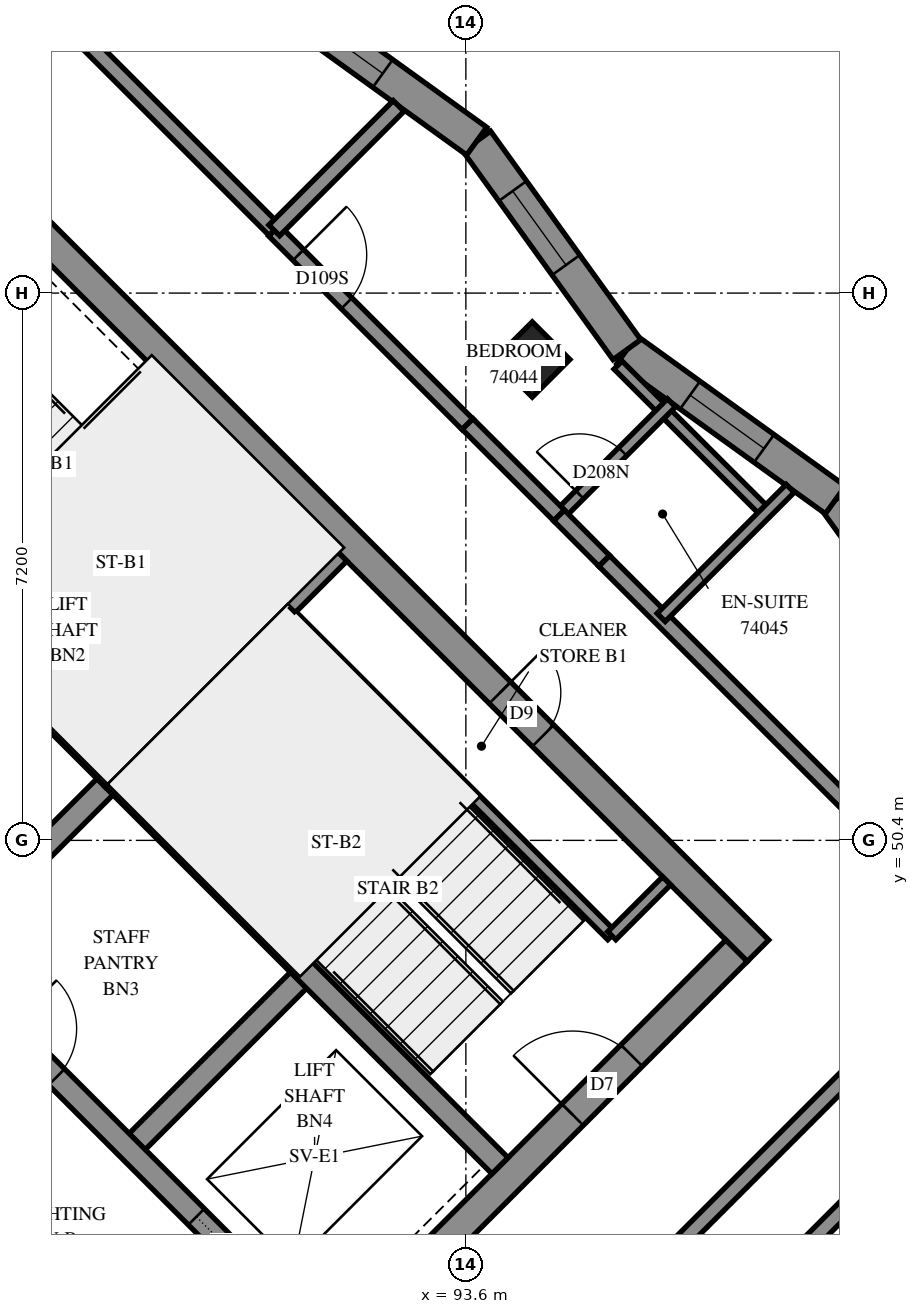
"""IFC4 building model, lengths in metres.
Left out: names, types, materials, properties, quantities, classifications, styles, units other than length and angle.
Written with IfcOpenShell. Run it as: python <this file> out.ifc"""

import sys

from ifc_helpers import new_model, si_unit, direction, frame, frame_2d, origin, origin_2d, place, context, subcontext, project, spatial, polyline, rectangle, outline, extrude, element, fill, save


model = new_model("IFC4")
c1 = context("Model", 3, precision=1e-05, world=origin(), true_north=direction((0.0, 1.0)))
c2 = subcontext(c1, "Body", "Model", "MODEL_VIEW")
j1 = project(units=[si_unit("LENGTHUNIT", "METRE"), si_unit("PLANEANGLEUNIT", "RADIAN")], contexts=[c1])
p1 = place(None, origin())
s1 = spatial("IfcSite", under=j1, at=p1, CompositionType="ELEMENT")
p2 = place(p1, origin())
s2 = spatial("IfcBuilding", under=s1, at=p2, CompositionType="ELEMENT")
p3 = place(p2, frame((0.0, 0.0, 271.0)))
s3 = spatial("IfcBuildingStorey", under=s2, at=p3, CompositionType="ELEMENT", Elevation=271.0)
p4 = place(p3, frame((94.474, 56.727, 0.0), z_axis=(0.0, 0.0, 1.0), x_axis=(0.7071067812, -0.7071067812, 0.0)))
e1 = element("IfcColumn", 1, at=p4, inside=s3, PredefinedType="COLUMN", context=c2, shape_type="SweptSolid", body=[
    extrude(rectangle(XDim=0.7, YDim=0.7, at=origin_2d()), origin(), (0.0, 0.0, 1.0), 3.1),
])
p5 = place(p3, frame((86.695, 59.696, -0.3), z_axis=(0.0, 0.0, 1.0), x_axis=(0.7071100706, -0.7071034917, 0.0)))
e2 = element("IfcWall", 2, at=p5, inside=s3, PredefinedType="SHEAR", context=c2, shape_type="SweptSolid", body=[
    extrude(rectangle(XDim=15.2, YDim=0.4, at=frame_2d((7.6, 0.0))), origin(), (0.0, 0.0, 1.0), 2.7),
])
p6 = place(p5, frame((10.4, 0.0, 0.3)))
e3 = element("IfcOpeningElement", 3, at=p6, cuts=e2, PredefinedType="OPENING", context=c2, shape_type="SweptSolid", body=[
    extrude(rectangle(XDim=0.8, YDim=2.1, at=frame_2d((0.4, 1.05))), frame((0.0, 0.21, 0.0), z_axis=(0.0, -1.0, 0.0), x_axis=(1.0, 0.0, 0.0)), (0.0, 0.0, 1.0), 0.42),
])
p7 = place(p3, frame((86.978, 38.766, -0.3), z_axis=(0.0, 0.0, 1.0), x_axis=(0.7071067812, 0.7071067812, 0.0)))
e4 = element("IfcWall", 4, at=p7, inside=s3, PredefinedType="SHEAR", context=c2, shape_type="SweptSolid", body=[
    extrude(rectangle(XDim=14.4, YDim=0.4, at=frame_2d((7.2, 0.0))), origin(), (0.0, 0.0, 1.0), 2.7),
])
p8 = place(p7, frame((4.55, 0.0, 0.3)))
e5 = element("IfcOpeningElement", 5, at=p8, cuts=e4, PredefinedType="OPENING", context=c2, shape_type="SweptSolid", body=[
    extrude(rectangle(XDim=1.1, YDim=2.1, at=frame_2d((0.55, 1.05))), frame((0.0, 0.21, 0.0), z_axis=(0.0, -1.0, 0.0), x_axis=(1.0, 0.0, 0.0)), (0.0, 0.0, 1.0), 0.42),
])
p9 = place(p7, frame((11.35, 0.0, 0.3)))
e6 = element("IfcOpeningElement", 6, at=p9, cuts=e4, PredefinedType="OPENING", context=c2, shape_type="SweptSolid", body=[
    extrude(rectangle(XDim=1.1, YDim=2.1, at=frame_2d((0.55, 1.05))), frame((0.0, 0.21, 0.0), z_axis=(0.0, -1.0, 0.0), x_axis=(1.0, 0.0, 0.0)), (0.0, 0.0, 1.0), 0.42),
])
for number, where, z_axis, x_axis in (
    (7, (86.625, 48.878, 0.0), (0.0, 0.0, 1.0), (0.707, 0.707, 0.0)),
    (8, (89.17, 46.332, 0.0), (0.0, 0.0, 1.0), (0.707, 0.707, 0.0)),
):
    element("IfcWall", number, at=place(p3, frame(where, z_axis=z_axis, x_axis=x_axis)), inside=s3, PredefinedType="SOLIDWALL", context=c2, shape_type="SweptSolid", body=[
        extrude(rectangle(XDim=3.3, YDim=0.3, at=frame_2d((1.65, 0.0))), origin(), (0.0, 0.0, 1.0), 3.1),
    ])
p10 = place(p3, frame((78.988, 51.423, 0.0), z_axis=(0.0, 0.0, 1.0), x_axis=(0.7071067812, -0.7071067812, 0.0)))
e9 = element("IfcWall", 9, at=p10, inside=s3, PredefinedType="SOLIDWALL", context=c2, shape_type="SweptSolid", body=[
    extrude(rectangle(XDim=14.4, YDim=0.3, at=frame_2d((7.2, 0.0))), origin(), (0.0, 0.0, 1.0), 3.1),
])
p11 = place(p10, frame((1.35, 0.0, 0.0)))
e10 = element("IfcOpeningElement", 10, at=p11, cuts=e9, PredefinedType="OPENING", context=c2, shape_type="SweptSolid", body=[
    extrude(rectangle(XDim=0.9, YDim=2.1, at=frame_2d((0.45, 1.05))), frame((0.0, 0.16, 0.0), z_axis=(0.0, -1.0, 0.0), x_axis=(1.0, 0.0, 0.0)), (0.0, 0.0, 1.0), 0.32),
])
p12 = place(p10, frame((4.95, 0.0, 0.0)))
e11 = element("IfcOpeningElement", 11, at=p12, cuts=e9, PredefinedType="OPENING", context=c2, shape_type="SweptSolid", body=[
    extrude(rectangle(XDim=0.9, YDim=2.1, at=frame_2d((0.45, 1.05))), frame((0.0, 0.16, 0.0), z_axis=(0.0, -1.0, 0.0), x_axis=(1.0, 0.0, 0.0)), (0.0, 0.0, 1.0), 0.32),
])
p13 = place(p10, frame((8.55, 0.0, 0.0)))
e12 = element("IfcOpeningElement", 12, at=p13, cuts=e9, PredefinedType="OPENING", context=c2, shape_type="SweptSolid", body=[
    extrude(rectangle(XDim=0.9, YDim=2.1, at=frame_2d((0.45, 1.05))), frame((0.0, 0.16, 0.0), z_axis=(0.0, -1.0, 0.0), x_axis=(1.0, 0.0, 0.0)), (0.0, 0.0, 1.0), 0.32),
])
p14 = place(p10, frame((12.05, 0.0, 0.0)))
e13 = element("IfcOpeningElement", 13, at=p14, cuts=e9, PredefinedType="OPENING", context=c2, shape_type="SweptSolid", body=[
    extrude(rectangle(XDim=1.1, YDim=2.1, at=frame_2d((0.55, 1.05))), frame((0.0, 0.16, 0.0), z_axis=(0.0, -1.0, 0.0), x_axis=(1.0, 0.0, 0.0)), (0.0, 0.0, 1.0), 0.32),
])
p15 = place(p3, frame((81.534, 53.969, 0.0), z_axis=(0.0, 0.0, 1.0), x_axis=(0.707103309, -0.7071102534, 0.0)))
e14 = element("IfcWall", 14, at=p15, inside=s3, PredefinedType="SOLIDWALL", context=c2, shape_type="SweptSolid", body=[
    extrude(rectangle(XDim=14.4, YDim=0.3, at=frame_2d((7.2, 0.0))), origin(), (0.0, 0.0, 1.0), 3.1),
])
p16 = place(p15, frame((8.55, 0.0, 0.0)))
e15 = element("IfcOpeningElement", 15, at=p16, cuts=e14, PredefinedType="OPENING", context=c2, shape_type="SweptSolid", body=[
    extrude(rectangle(XDim=0.9, YDim=2.1, at=frame_2d((0.45, 1.05))), frame((0.0, 0.16, 0.0), z_axis=(0.0, -1.0, 0.0), x_axis=(1.0, 0.0, 0.0)), (0.0, 0.0, 1.0), 0.32),
])
p17 = place(p15, frame((1.25, 0.0, 0.0)))
e16 = element("IfcOpeningElement", 16, at=p17, cuts=e14, PredefinedType="OPENING", context=c2, shape_type="SweptSolid", body=[
    extrude(rectangle(XDim=1.1, YDim=2.1, at=frame_2d((0.55, 1.05))), frame((0.0, 0.16, 0.0), z_axis=(0.0, -1.0, 0.0), x_axis=(1.0, 0.0, 0.0)), (0.0, 0.0, 1.0), 0.32),
])
p18 = place(p15, frame((4.85, 0.0, 0.0)))
e17 = element("IfcOpeningElement", 17, at=p18, cuts=e14, PredefinedType="OPENING", context=c2, shape_type="SweptSolid", body=[
    extrude(rectangle(XDim=1.1, YDim=2.1, at=frame_2d((0.55, 1.05))), frame((0.0, 0.16, 0.0), z_axis=(0.0, -1.0, 0.0), x_axis=(1.0, 0.0, 0.0)), (0.0, 0.0, 1.0), 0.32),
])
p19 = place(p15, frame((12.05, 0.0, 0.0)))
e18 = element("IfcOpeningElement", 18, at=p19, cuts=e14, PredefinedType="OPENING", context=c2, shape_type="SweptSolid", body=[
    extrude(rectangle(XDim=1.1, YDim=2.1, at=frame_2d((0.55, 1.05))), frame((0.0, 0.16, 0.0), z_axis=(0.0, -1.0, 0.0), x_axis=(1.0, 0.0, 0.0)), (0.0, 0.0, 1.0), 0.32),
])
for number, where, z_axis, x_axis in (
    (19, (83.867, 56.302, 0.0), (0.0, 0.0, 1.0), (0.707, -0.707, 0.0)),
    (20, (88.958, 51.211, 0.0), (0.0, 0.0, 1.0), (0.707, -0.707, 0.0)),
):
    element("IfcWall", number, at=place(p3, frame(where, z_axis=z_axis, x_axis=x_axis)), inside=s3, PredefinedType="SOLIDWALL", context=c2, shape_type="SweptSolid", body=[
        extrude(rectangle(XDim=7.2, YDim=0.3, at=frame_2d((3.6, 0.0))), origin(), (0.0, 0.0, 1.0), 3.1),
    ])
p20 = place(p3, frame((88.958, 51.211, 0.0), z_axis=(0.0, 0.0, 1.0), x_axis=(0.7071067812, 0.7071067812, 0.0)))
e21 = element("IfcWall", 21, at=p20, inside=s3, PredefinedType="SOLIDWALL", context=c2, shape_type="SweptSolid", body=[
    extrude(rectangle(XDim=4.2, YDim=0.3, at=frame_2d((2.1, 0.0))), origin(), (0.0, 0.0, 1.0), 3.1),
])
p21 = place(p3, frame((100.45, 52.121, 0.0), z_axis=(0.0, 0.0, 1.0), x_axis=(-0.5846130088, 0.8113122888, 0.0)))
e22 = element("IfcWall", 22, at=p21, inside=s3, PredefinedType="SOLIDWALL", context=c2, shape_type="SweptSolid", body=[
    extrude(outline(polyline([(0.056, -0.225), (3.437, -0.225), (3.364, 0.225), (-0.056, 0.225), (0.056, -0.225)])), origin(), (0.0, 0.0, 1.0), 3.1),
])
p22 = place(p21, frame((1.082, 0.0, 0.45)))
e23 = element("IfcOpeningElement", 23, at=p22, cuts=e22, PredefinedType="OPENING", context=c2, shape_type="SweptSolid", body=[
    extrude(rectangle(XDim=1.2, YDim=2.55, at=frame_2d((0.6, 1.275))), frame((0.0, 0.235, 0.0), z_axis=(0.0, -1.0, 0.0), x_axis=(1.0, 0.0, 0.0)), (0.0, 0.0, 1.0), 0.47),
])
p23 = place(p3, frame((98.462, 54.88, 0.0), z_axis=(0.0, 0.0, 1.0), x_axis=(-0.8113121077, 0.5846132601, 0.0)))
e24 = element("IfcWall", 24, at=p23, inside=s3, PredefinedType="SOLIDWALL", context=c2, shape_type="SweptSolid", body=[
    extrude(outline(polyline([(-0.036, -0.225), (3.344, -0.225), (3.417, 0.225), (0.036, 0.225), (-0.036, -0.225)])), origin(), (0.0, 0.0, 1.0), 3.1),
])
p24 = place(p23, frame((1.157, 0.0, 0.45)))
e25 = element("IfcOpeningElement", 25, at=p24, cuts=e24, PredefinedType="OPENING", context=c2, shape_type="SweptSolid", body=[
    extrude(rectangle(XDim=1.2, YDim=2.55, at=frame_2d((0.6, 1.275))), frame((0.0, 0.235, 0.0), z_axis=(0.0, -1.0, 0.0), x_axis=(1.0, 0.0, 0.0)), (0.0, 0.0, 1.0), 0.47),
])
p25 = place(p3, frame((95.719, 56.856, 0.0), z_axis=(0.0, 0.0, 1.0), x_axis=(-0.5846132601, 0.8113121077, 0.0)))
e26 = element("IfcWall", 26, at=p25, inside=s3, PredefinedType="SOLIDWALL", context=c2, shape_type="SweptSolid", body=[
    extrude(outline(polyline([(0.036, -0.225), (3.417, -0.225), (3.344, 0.225), (-0.036, 0.225), (0.036, -0.225)])), origin(), (0.0, 0.0, 1.0), 3.1),
])
p26 = place(p25, frame((1.372, 0.0, 0.45)))
e27 = element("IfcOpeningElement", 27, at=p26, cuts=e26, PredefinedType="OPENING", context=c2, shape_type="SweptSolid", body=[
    extrude(rectangle(XDim=1.2, YDim=2.55, at=frame_2d((0.6, 1.275))), frame((0.0, 0.235, 0.0), z_axis=(0.0, -1.0, 0.0), x_axis=(1.0, 0.0, 0.0)), (0.0, 0.0, 1.0), 0.47),
])
p27 = place(p3, frame((93.742, 59.599, 0.0), z_axis=(0.0, 0.0, 1.0), x_axis=(-0.8113222169, 0.5845992306, 0.0)))
e28 = element("IfcWall", 28, at=p27, inside=s3, PredefinedType="SOLIDWALL", context=c2, shape_type="SweptSolid", body=[
    extrude(outline(polyline([(-0.036, -0.225), (3.344, -0.225), (3.417, 0.225), (0.036, 0.225), (-0.036, -0.225)])), origin(), (0.0, 0.0, 1.0), 3.1),
])
p28 = place(p27, frame((1.523, 0.0, 0.45)))
e29 = element("IfcOpeningElement", 29, at=p28, cuts=e28, PredefinedType="OPENING", context=c2, shape_type="SweptSolid", body=[
    extrude(rectangle(XDim=1.2, YDim=2.55, at=frame_2d((0.6, 1.275))), frame((0.0, 0.235, 0.0), z_axis=(0.0, -1.0, 0.0), x_axis=(1.0, 0.0, 0.0)), (0.0, 0.0, 1.0), 0.47),
])
p29 = place(p3, frame((91.313, 53.354, 0.0), z_axis=(0.0, 0.0, 1.0), x_axis=(0.7071067812, -0.7071067812, 0.0)))
e30 = element("IfcWall", 30, at=p29, inside=s3, PredefinedType="PARTITIONING", context=c2, shape_type="SweptSolid", body=[
    extrude(rectangle(XDim=5.95, YDim=0.15, at=frame_2d((2.975, 0.0))), origin(), (0.0, 0.0, 1.0), 3.1),
])
p30 = place(p3, frame((95.52, 49.146, 0.0), z_axis=(0.0, 0.0, 1.0), x_axis=(0.7071067812, 0.7071067812, 0.0)))
e31 = element("IfcWall", 31, at=p30, inside=s3, PredefinedType="PARTITIONING", context=c2, shape_type="SweptSolid", body=[
    extrude(rectangle(XDim=1.02, YDim=0.15, at=frame_2d((0.51, 0.0))), origin(), (0.0, 0.0, 1.0), 3.1),
])
p31 = place(p3, frame((93.908, 42.586, 0.0), z_axis=(0.0, 0.0, 1.0), x_axis=(0.7071067812, 0.7071067812, 0.0)))
e32 = element("IfcWall", 32, at=p31, inside=s3, PredefinedType="PARTITIONING", context=c2, shape_type="SweptSolid", body=[
    extrude(rectangle(XDim=9.198, YDim=0.2, at=frame_2d((4.599, 0.0))), origin(), (0.0, 0.0, 1.0), 3.1),
])
p32 = place(p31, frame((0.254, 0.0, 0.0)))
e33 = element("IfcOpeningElement", 33, at=p32, cuts=e32, PredefinedType="OPENING", context=c2, shape_type="SweptSolid", body=[
    extrude(rectangle(XDim=1.0, YDim=2.1, at=frame_2d((0.5, 1.05))), frame((0.0, 0.11, 0.0), z_axis=(0.0, -1.0, 0.0), x_axis=(1.0, 0.0, 0.0)), (0.0, 0.0, 1.0), 0.22),
])
p33 = place(p3, frame((95.419, 54.077, 0.0), z_axis=(0.0, 0.0, 1.0), x_axis=(0.7071067812, -0.7071067812, 0.0)))
e34 = element("IfcWall", 34, at=p33, inside=s3, PredefinedType="PARTITIONING", context=c2, shape_type="SweptSolid", body=[
    extrude(rectangle(XDim=7.057, YDim=0.2, at=frame_2d((3.528, 0.0))), origin(), (0.0, 0.0, 1.0), 3.1),
])
p34 = place(p3, frame((94.755, 41.737, 0.0), z_axis=(0.0, 0.0, 1.0), x_axis=(0.7071146549, 0.7070989073, 0.0)))
e35 = element("IfcWall", 35, at=p34, inside=s3, PredefinedType="PARTITIONING", context=c2, shape_type="SweptSolid", body=[
    extrude(rectangle(XDim=6.35, YDim=0.2, at=frame_2d((3.175, 0.0))), origin(), (0.0, 0.0, 1.0), 3.1),
])
p35 = place(p3, frame((88.537, 60.973, 0.0), z_axis=(0.0, 0.0, 1.0), x_axis=(0.7071067812, -0.7071067812, 0.0)))
e36 = element("IfcWall", 36, at=p35, inside=s3, PredefinedType="PARTITIONING", context=c2, shape_type="SweptSolid", body=[
    extrude(rectangle(XDim=3.601, YDim=0.2, at=frame_2d((1.8, 0.0))), origin(), (0.0, 0.0, 1.0), 3.1),
])
p36 = place(p3, frame((91.077, 58.421, 0.0), z_axis=(0.0, 0.0, 1.0), x_axis=(0.7068288851, -0.7073845681, 0.0)))
e37 = element("IfcWall", 37, at=p36, inside=s3, PredefinedType="PARTITIONING", context=c2, shape_type="SweptSolid", body=[
    extrude(rectangle(XDim=3.599, YDim=0.2, at=frame_2d((1.8, 0.0))), origin(), (0.0, 0.0, 1.0), 3.1),
])
p37 = place(p36, frame((0.451, 0.0, 0.0)))
e38 = element("IfcOpeningElement", 38, at=p37, cuts=e37, PredefinedType="OPENING", context=c2, shape_type="SweptSolid", body=[
    extrude(rectangle(XDim=0.9, YDim=2.1, at=frame_2d((0.45, 1.05))), frame((0.0, 0.11, 0.0), z_axis=(0.0, -1.0, 0.0), x_axis=(1.0, 0.0, 0.0)), (0.0, 0.0, 1.0), 0.22),
])
p38 = place(p3, frame((95.602, 56.653, 0.0), z_axis=(0.0, 0.0, 1.0), x_axis=(0.7076157525, -0.7065974433, 0.0)))
e39 = element("IfcWall", 39, at=p38, inside=s3, PredefinedType="PARTITIONING", context=c2, shape_type="SweptSolid", body=[
    extrude(rectangle(XDim=2.75, YDim=0.15, at=frame_2d((1.375, 0.0))), origin(), (0.0, 0.0, 1.0), 3.1),
])
p39 = place(p3, frame((96.169, 53.333, 0.0), z_axis=(0.0, 0.0, 1.0), x_axis=(0.7071067812, 0.7071067812, 0.0)))
e40 = element("IfcWall", 40, at=p39, inside=s3, PredefinedType="PARTITIONING", context=c2, shape_type="SweptSolid", body=[
    extrude(rectangle(XDim=2.401, YDim=0.15, at=frame_2d((1.201, 0.0))), origin(), (0.0, 0.0, 1.0), 3.1),
])
p40 = place(p3, frame((91.079, 58.425, 0.0), z_axis=(0.0, 0.0, 1.0), x_axis=(0.7071067812, 0.7071067812, 0.0)))
e41 = element("IfcWall", 41, at=p40, inside=s3, PredefinedType="PARTITIONING", context=c2, shape_type="SweptSolid", body=[
    extrude(rectangle(XDim=2.314, YDim=0.2, at=frame_2d((1.157, 0.0))), origin(), (0.0, 0.0, 1.0), 3.1),
])
p41 = place(p3, frame((94.827, 54.677, 0.0), z_axis=(0.0, 0.0, 1.0), x_axis=(0.7070828702, 0.7071306913, 0.0)))
e42 = element("IfcWall", 42, at=p41, inside=s3, PredefinedType="PARTITIONING", context=c2, shape_type="SweptSolid", body=[
    extrude(rectangle(XDim=2.091, YDim=0.15, at=frame_2d((1.046, 0.0))), origin(), (0.0, 0.0, 1.0), 3.1),
])
p42 = place(p41, frame((0.383, 0.0, 0.0)))
e43 = element("IfcOpeningElement", 43, at=p42, cuts=e42, PredefinedType="OPENING", context=c2, shape_type="SweptSolid", body=[
    extrude(rectangle(XDim=0.8, YDim=2.1, at=frame_2d((0.4, 1.05))), frame((0.0, 0.085, 0.0), z_axis=(0.0, -1.0, 0.0), x_axis=(1.0, 0.0, 0.0)), (0.0, 0.0, 1.0), 0.17),
])
p43 = place(p3, frame((93.623, 55.877, 0.0), z_axis=(0.0, 0.0, 1.0), x_axis=(0.7076943229, -0.7065187509, 0.0)))
e44 = element("IfcWall", 44, at=p43, inside=s3, PredefinedType="PARTITIONING", context=c2, shape_type="SweptSolid", body=[
    extrude(rectangle(XDim=1.701, YDim=0.2, at=frame_2d((0.851, 0.0))), origin(), (0.0, 0.0, 1.0), 3.1),
])
p44 = place(p3, frame((94.826, 54.674, 0.0), z_axis=(0.0, 0.0, 1.0), x_axis=(0.7059173694, -0.7082941956, 0.0)))
e45 = element("IfcWall", 45, at=p44, inside=s3, PredefinedType="PARTITIONING", context=c2, shape_type="SweptSolid", body=[
    extrude(rectangle(XDim=0.842, YDim=0.2, at=frame_2d((0.421, 0.0))), origin(), (0.0, 0.0, 1.0), 3.1),
])
p45 = place(p24, origin())
e46 = element("IfcWindow", 46, at=p45, inside=s3, PartitioningType="SINGLE_PANEL", PredefinedType="WINDOW", context=c2, shape_type="SweptSolid", body=[
    extrude(rectangle(XDim=1.2, YDim=2.55, at=frame_2d((0.6, 1.275))), frame((0.0, 0.205, 0.0), z_axis=(0.0, -1.0, 0.0), x_axis=(1.0, 0.0, 0.0)), (0.0, 0.0, 1.0), 0.06),
])
fill(e25, e46)
p46 = place(p26, origin())
e47 = element("IfcWindow", 47, at=p46, inside=s3, PartitioningType="SINGLE_PANEL", PredefinedType="WINDOW", context=c2, shape_type="SweptSolid", body=[
    extrude(rectangle(XDim=1.2, YDim=2.55, at=frame_2d((0.6, 1.275))), frame((0.0, 0.205, 0.0), z_axis=(0.0, -1.0, 0.0), x_axis=(1.0, 0.0, 0.0)), (0.0, 0.0, 1.0), 0.06),
])
fill(e27, e47)
p47 = place(p28, origin())
e48 = element("IfcWindow", 48, at=p47, inside=s3, PartitioningType="SINGLE_PANEL", PredefinedType="WINDOW", context=c2, shape_type="SweptSolid", body=[
    extrude(rectangle(XDim=1.2, YDim=2.55, at=frame_2d((0.6, 1.275))), frame((0.0, 0.205, 0.0), z_axis=(0.0, -1.0, 0.0), x_axis=(1.0, 0.0, 0.0)), (0.0, 0.0, 1.0), 0.06),
])
fill(e29, e48)
p48 = place(p6, origin())
e49 = element("IfcDoor", 49, at=p48, inside=s3, OperationType="SINGLE_SWING_RIGHT", PredefinedType="DOOR", context=c2, shape_type="SweptSolid", body=[
    extrude(rectangle(XDim=0.8, YDim=2.1, at=frame_2d((0.4, 1.05))), frame((0.0, 0.025, 0.0), z_axis=(0.0, -1.0, 0.0), x_axis=(1.0, 0.0, 0.0)), (0.0, 0.0, 1.0), 0.05),
])
fill(e3, e49)
p49 = place(p9, origin())
e50 = element("IfcDoor", 50, at=p49, inside=s3, OperationType="SINGLE_SWING_RIGHT", PredefinedType="DOOR", context=c2, shape_type="SweptSolid", body=[
    extrude(rectangle(XDim=1.1, YDim=2.1, at=frame_2d((0.55, 1.05))), frame((0.0, 0.025, 0.0), z_axis=(0.0, -1.0, 0.0), x_axis=(1.0, 0.0, 0.0)), (0.0, 0.0, 1.0), 0.05),
])
fill(e6, e50)
p50 = place(p16, origin())
e51 = element("IfcDoor", 51, at=p50, inside=s3, OperationType="SINGLE_SWING_LEFT", PredefinedType="DOOR", context=c2, shape_type="SweptSolid", body=[
    extrude(rectangle(XDim=0.9, YDim=2.1, at=frame_2d((0.45, 1.05))), frame((0.0, 0.025, 0.0), z_axis=(0.0, -1.0, 0.0), x_axis=(1.0, 0.0, 0.0)), (0.0, 0.0, 1.0), 0.05),
])
fill(e15, e51)
p51 = place(p19, origin())
e52 = element("IfcDoor", 52, at=p51, inside=s3, OperationType="SLIDING_TO_RIGHT", PredefinedType="DOOR", context=c2, shape_type="SweptSolid", body=[
    extrude(rectangle(XDim=1.1, YDim=2.1, at=frame_2d((0.55, 1.05))), frame((0.0, 0.025, 0.0), z_axis=(0.0, -1.0, 0.0), x_axis=(1.0, 0.0, 0.0)), (0.0, 0.0, 1.0), 0.05),
])
fill(e18, e52)
p52 = place(p37, origin())
e53 = element("IfcDoor", 53, at=p52, inside=s3, OperationType="SINGLE_SWING_RIGHT", PredefinedType="DOOR", context=c2, shape_type="SweptSolid", body=[
    extrude(rectangle(XDim=0.9, YDim=2.1, at=frame_2d((0.45, 1.05))), frame((0.0, 0.025, 0.0), z_axis=(0.0, -1.0, 0.0), x_axis=(1.0, 0.0, 0.0)), (0.0, 0.0, 1.0), 0.05),
])
fill(e38, e53)
p53 = place(p42, origin())
e54 = element("IfcDoor", 54, at=p53, inside=s3, OperationType="SINGLE_SWING_RIGHT", PredefinedType="DOOR", context=c2, shape_type="SweptSolid", body=[
    extrude(rectangle(XDim=0.8, YDim=2.1, at=frame_2d((0.4, 1.05))), frame((0.0, 0.025, 0.0), z_axis=(0.0, -1.0, 0.0), x_axis=(1.0, 0.0, 0.0)), (0.0, 0.0, 1.0), 0.05),
])
fill(e43, e54)
save(model, sys.argv[1])
